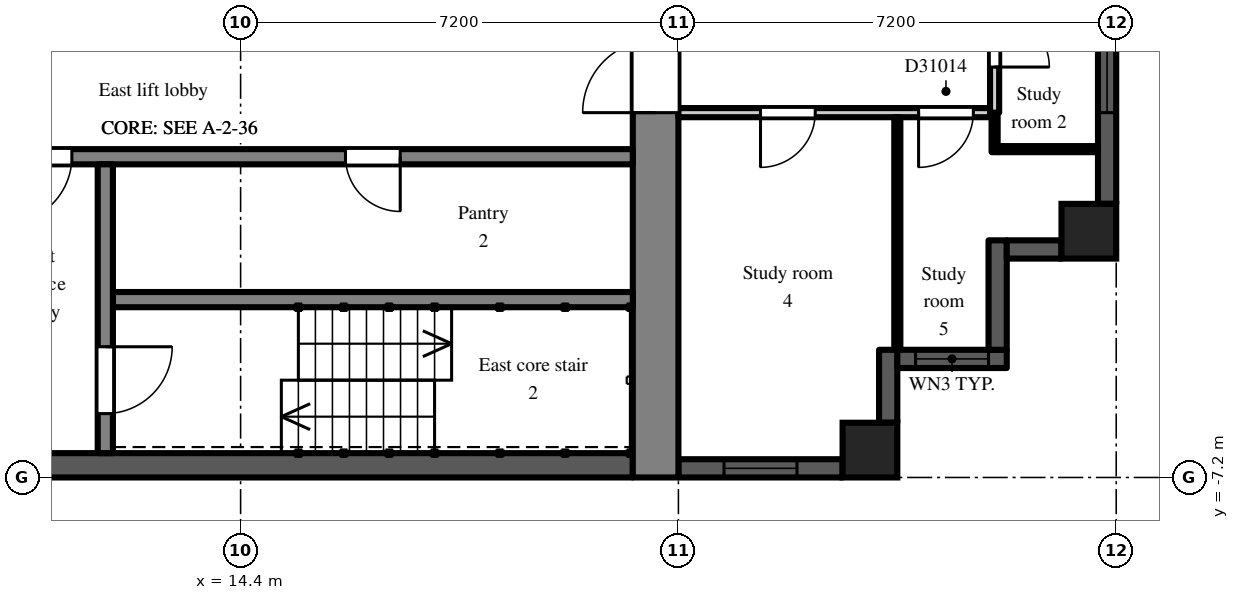
"""IFC4 building model, lengths in metres.
Left out: names, types, materials, properties, quantities, classifications, styles, units other than length and angle.
Written with IfcOpenShell. Run it as: python <this file> out.ifc"""

import sys

from ifc_helpers import new_model, si_unit, direction, frame, frame_2d, origin, origin_2d, place, context, subcontext, project, spatial, rectangle, extrude, element, fill, save


model = new_model("IFC4")
c1 = context("Model", 3, precision=1e-05, world=origin(), true_north=direction((0.0, 1.0)))
c2 = subcontext(c1, "Body", "Model", "MODEL_VIEW")
j1 = project(units=[si_unit("LENGTHUNIT", "METRE"), si_unit("PLANEANGLEUNIT", "RADIAN")], contexts=[c1])
p1 = place(None, origin())
s1 = spatial("IfcSite", under=j1, at=p1, CompositionType="ELEMENT")
p2 = place(p1, origin())
s2 = spatial("IfcBuilding", under=s1, at=p2, CompositionType="ELEMENT")
p3 = place(p2, frame((0.0, 0.0, 216.9)))
s3 = spatial("IfcBuildingStorey", under=s2, at=p3, CompositionType="ELEMENT", Elevation=216.9)
for number, where, z_axis, x_axis in (
    (1, (24.75, -6.75, 0.0), (0.0, 0.0, 1.0), (1.0, 0.0, 0.0)),
    (2, (28.35, -3.15, 0.0), (0.0, 0.0, 1.0), (1.0, 0.0, 0.0)),
):
    element("IfcColumn", number, at=place(p3, frame(where, z_axis=z_axis, x_axis=x_axis)), inside=s3, PredefinedType="COLUMN", context=c2, shape_type="SweptSolid", body=[
        extrude(rectangle(XDim=0.9, YDim=0.9, at=origin_2d()), origin(), (0.0, 0.0, 1.0), 3.0),
    ])
p4 = place(p3, frame((21.6, -7.05, 0.0), z_axis=(0.0, 0.0, 1.0), x_axis=(1.0, 0.0, 0.0)))
e3 = element("IfcWall", 3, at=p4, inside=s3, PredefinedType="SOLIDWALL", context=c2, shape_type="SweptSolid", body=[
    extrude(rectangle(XDim=2.7, YDim=0.3, at=frame_2d((1.35, 0.0))), origin(), (0.0, 0.0, 1.0), 2.3),
])
p5 = place(p4, frame((0.75, 0.0, 0.2)))
e4 = element("IfcOpeningElement", 4, at=p5, cuts=e3, PredefinedType="OPENING", context=c2, shape_type="SweptSolid", body=[
    extrude(rectangle(XDim=1.2, YDim=1.85, at=frame_2d((0.6, 0.925))), frame((0.0, 0.16, 0.0), z_axis=(0.0, -1.0, 0.0), x_axis=(1.0, 0.0, 0.0)), (0.0, 0.0, 1.0), 0.32),
])
p6 = place(p3, frame((25.05, -6.3, 0.0), z_axis=(0.0, 0.0, 1.0), x_axis=(0.0, 1.0, 0.0)))
e5 = element("IfcWall", 5, at=p6, inside=s3, PredefinedType="SOLIDWALL", context=c2, shape_type="SweptSolid", body=[
    extrude(rectangle(XDim=1.2, YDim=0.3, at=frame_2d((0.6, 0.0))), origin(), (0.0, 0.0, 1.0), 2.6),
])
p7 = place(p3, frame((25.2, -5.25, 0.0), z_axis=(0.0, 0.0, 1.0), x_axis=(1.0, 0.0, 0.0)))
e6 = element("IfcWall", 6, at=p7, inside=s3, PredefinedType="SOLIDWALL", context=c2, shape_type="SweptSolid", body=[
    extrude(rectangle(XDim=1.8, YDim=0.3, at=frame_2d((0.9, 0.0))), origin(), (0.0, 0.0, 1.0), 2.6),
])
p8 = place(p7, frame((0.3, 0.0, 0.2)))
e7 = element("IfcOpeningElement", 7, at=p8, cuts=e6, PredefinedType="OPENING", context=c2, shape_type="SweptSolid", body=[
    extrude(rectangle(XDim=1.2, YDim=1.85, at=frame_2d((0.6, 0.925))), frame((0.0, 0.16, 0.0), z_axis=(0.0, -1.0, 0.0), x_axis=(1.0, 0.0, 0.0)), (0.0, 0.0, 1.0), 0.32),
])
p9 = place(p3, frame((26.85, -5.1, 0.0), z_axis=(0.0, 0.0, 1.0), x_axis=(0.0, 1.0, 0.0)))
e8 = element("IfcWall", 8, at=p9, inside=s3, PredefinedType="SOLIDWALL", context=c2, shape_type="SweptSolid", body=[
    extrude(rectangle(XDim=1.8, YDim=0.3, at=frame_2d((0.9, 0.0))), origin(), (0.0, 0.0, 1.0), 2.6),
])
p10 = place(p3, frame((27.0, -3.45, 0.0), z_axis=(0.0, 0.0, 1.0), x_axis=(1.0, 0.0, 0.0)))
e9 = element("IfcWall", 9, at=p10, inside=s3, PredefinedType="SOLIDWALL", context=c2, shape_type="SweptSolid", body=[
    extrude(rectangle(XDim=0.9, YDim=0.3, at=frame_2d((0.45, 0.0))), origin(), (0.0, 0.0, 1.0), 2.6),
])
p11 = place(p3, frame((28.65, -2.7, 0.0), z_axis=(0.0, 0.0, 1.0), x_axis=(0.0, 1.0, 0.0)))
e10 = element("IfcWall", 10, at=p11, inside=s3, PredefinedType="SOLIDWALL", context=c2, shape_type="SweptSolid", body=[
    extrude(rectangle(XDim=5.4, YDim=0.3, at=frame_2d((2.7, 0.0))), origin(), (0.0, 0.0, 1.0), 2.3),
])
p12 = place(p11, frame((1.5, 0.0, 0.2)))
e11 = element("IfcOpeningElement", 11, at=p12, cuts=e10, PredefinedType="OPENING", context=c2, shape_type="SweptSolid", body=[
    extrude(rectangle(XDim=2.4, YDim=1.85, at=frame_2d((1.2, 0.925))), frame((0.0, 0.16, 0.0), z_axis=(0.0, -1.0, 0.0), x_axis=(1.0, 0.0, 0.0)), (0.0, 0.0, 1.0), 0.32),
])
p13 = place(p3, frame((21.225, -7.2, 0.0), z_axis=(0.0, 0.0, 1.0), x_axis=(0.0, 1.0, 0.0)))
e12 = element("IfcWall", 12, at=p13, inside=s3, PredefinedType="SHEAR", context=c2, shape_type="SweptSolid", body=[
    extrude(rectangle(XDim=14.4, YDim=0.75, at=frame_2d((7.2, 0.0))), origin(), (0.0, 0.0, 1.0), 2.6),
])
p14 = place(p13, frame((6.0, 0.0, 0.0)))
e13 = element("IfcOpeningElement", 13, at=p14, cuts=e12, PredefinedType="OPENING", context=c2, shape_type="SweptSolid", body=[
    extrude(rectangle(XDim=2.4, YDim=2.2, at=frame_2d((1.2, 1.1))), frame((0.0, 0.385, 0.0), z_axis=(0.0, -1.0, 0.0), x_axis=(1.0, 0.0, 0.0)), (0.0, 0.0, 1.0), 0.77),
])
p15 = place(p3, frame((7.9, -7.0, 0.0), z_axis=(0.0, 0.0, 1.0), x_axis=(1.0, 0.0, 0.0)))
e14 = element("IfcWall", 14, at=p15, inside=s3, PredefinedType="SHEAR", context=c2, shape_type="SweptSolid", body=[
    extrude(rectangle(XDim=12.95, YDim=0.4, at=frame_2d((6.475, 0.0))), origin(), (0.0, 0.0, 1.0), 2.6),
])
p16 = place(p3, frame((7.9, -1.925, 0.0), z_axis=(0.0, 0.0, 1.0), x_axis=(1.0, 0.0, 0.0)))
e15 = element("IfcWall", 15, at=p16, inside=s3, PredefinedType="SHEAR", context=c2, shape_type="SweptSolid", body=[
    extrude(rectangle(XDim=12.95, YDim=0.25, at=frame_2d((6.475, 0.0))), origin(), (0.0, 0.0, 1.0), 2.6),
])
p17 = place(p16, frame((0.525, 0.0, 0.0)))
e16 = element("IfcOpeningElement", 16, at=p17, cuts=e15, PredefinedType="OPENING", context=c2, shape_type="SweptSolid", body=[
    extrude(rectangle(XDim=0.9, YDim=2.1, at=frame_2d((0.45, 1.05))), frame((0.0, 0.135, 0.0), z_axis=(0.0, -1.0, 0.0), x_axis=(1.0, 0.0, 0.0)), (0.0, 0.0, 1.0), 0.27),
])
p18 = place(p16, frame((2.625, 0.0, 0.0)))
e17 = element("IfcOpeningElement", 17, at=p18, cuts=e15, PredefinedType="OPENING", context=c2, shape_type="SweptSolid", body=[
    extrude(rectangle(XDim=1.1, YDim=2.1, at=frame_2d((0.55, 1.05))), frame((0.0, 0.135, 0.0), z_axis=(0.0, -1.0, 0.0), x_axis=(1.0, 0.0, 0.0)), (0.0, 0.0, 1.0), 0.27),
])
p19 = place(p16, frame((8.225, 0.0, 0.0)))
e18 = element("IfcOpeningElement", 18, at=p19, cuts=e15, PredefinedType="OPENING", context=c2, shape_type="SweptSolid", body=[
    extrude(rectangle(XDim=0.9, YDim=2.1, at=frame_2d((0.45, 1.05))), frame((0.0, 0.135, 0.0), z_axis=(0.0, -1.0, 0.0), x_axis=(1.0, 0.0, 0.0)), (0.0, 0.0, 1.0), 0.27),
])
p20 = place(p3, frame((12.3, -4.275, 0.0), z_axis=(0.0, 0.0, 1.0), x_axis=(1.0, 0.0, 0.0)))
e19 = element("IfcWall", 19, at=p20, inside=s3, PredefinedType="SHEAR", context=c2, shape_type="SweptSolid", body=[
    extrude(rectangle(XDim=8.55, YDim=0.25, at=frame_2d((4.275, 0.0))), origin(), (0.0, 0.0, 1.0), 2.6),
])
p21 = place(p3, frame((12.175, -2.05, 0.0), z_axis=(0.0, 0.0, 1.0), x_axis=(0.0, -1.0, 0.0)))
e20 = element("IfcWall", 20, at=p21, inside=s3, PredefinedType="SHEAR", context=c2, shape_type="SweptSolid", body=[
    extrude(rectangle(XDim=4.75, YDim=0.25, at=frame_2d((2.375, 0.0))), origin(), (0.0, 0.0, 1.0), 2.6),
])
p22 = place(p21, frame((3.0, 0.0, 0.0)))
e21 = element("IfcOpeningElement", 21, at=p22, cuts=e20, PredefinedType="OPENING", context=c2, shape_type="SweptSolid", body=[
    extrude(rectangle(XDim=1.1, YDim=2.1, at=frame_2d((0.55, 1.05))), frame((0.0, 0.135, 0.0), z_axis=(0.0, -1.0, 0.0), x_axis=(1.0, 0.0, 0.0)), (0.0, 0.0, 1.0), 0.27),
])
p23 = place(p3, frame((21.6, -1.2, 0.0), z_axis=(0.0, 0.0, 1.0), x_axis=(1.0, 0.0, 0.0)))
e22 = element("IfcWall", 22, at=p23, inside=s3, PredefinedType="PARTITIONING", context=c2, shape_type="SweptSolid", body=[
    extrude(rectangle(XDim=5.125, YDim=0.15, at=frame_2d((2.562, 0.0))), origin(), (0.0, 0.0, 1.0), 2.6),
])
p24 = place(p23, frame((1.35, 0.0, 0.0)))
e23 = element("IfcOpeningElement", 23, at=p24, cuts=e22, PredefinedType="OPENING", context=c2, shape_type="SweptSolid", body=[
    extrude(rectangle(XDim=0.9, YDim=2.1, at=frame_2d((0.45, 1.05))), frame((0.0, 0.085, 0.0), z_axis=(0.0, -1.0, 0.0), x_axis=(1.0, 0.0, 0.0)), (0.0, 0.0, 1.0), 0.17),
])
p25 = place(p23, frame((3.95, 0.0, 0.0)))
e24 = element("IfcOpeningElement", 24, at=p25, cuts=e22, PredefinedType="OPENING", context=c2, shape_type="SweptSolid", body=[
    extrude(rectangle(XDim=0.9, YDim=2.1, at=frame_2d((0.45, 1.05))), frame((0.0, 0.085, 0.0), z_axis=(0.0, -1.0, 0.0), x_axis=(1.0, 0.0, 0.0)), (0.0, 0.0, 1.0), 0.17),
])
p26 = place(p3, frame((25.2, -5.1, 0.0), z_axis=(0.0, 0.0, 1.0), x_axis=(0.0, 1.0, 0.0)))
e25 = element("IfcWall", 25, at=p26, inside=s3, PredefinedType="PARTITIONING", context=c2, shape_type="SweptSolid", body=[
    extrude(rectangle(XDim=3.825, YDim=0.1, at=frame_2d((1.913, 0.0))), origin(), (0.0, 0.0, 1.0), 2.6),
])
p27 = place(p3, frame((26.8, -1.85, 0.0), z_axis=(0.0, 0.0, 1.0), x_axis=(0.0, 1.0, 0.0)))
e26 = element("IfcWall", 26, at=p27, inside=s3, PredefinedType="PARTITIONING", context=c2, shape_type="SweptSolid", body=[
    extrude(rectangle(XDim=0.65, YDim=0.1, at=frame_2d((0.325, 0.0))), origin(), (0.0, 0.0, 1.0), 2.6),
])
p28 = place(p3, frame((26.85, -1.8, 0.0), z_axis=(0.0, 0.0, 1.0), x_axis=(1.0, 0.0, 0.0)))
e27 = element("IfcWall", 27, at=p28, inside=s3, PredefinedType="PARTITIONING", context=c2, shape_type="SweptSolid", body=[
    extrude(rectangle(XDim=1.65, YDim=0.1, at=frame_2d((0.825, 0.0))), origin(), (0.0, 0.0, 1.0), 2.6),
])
p29 = place(p3, frame((26.8, -1.2, 0.0), z_axis=(0.0, 0.0, 1.0), x_axis=(0.0, 1.0, 0.0)))
e28 = element("IfcWall", 28, at=p29, inside=s3, PredefinedType="PARTITIONING", context=c2, shape_type="SweptSolid", body=[
    extrude(rectangle(XDim=2.4, YDim=0.15, at=frame_2d((1.2, 0.0))), origin(), (0.0, 0.0, 1.0), 2.6),
])
p30 = place(p29, frame((0.75, 0.0, 0.0)))
e29 = element("IfcOpeningElement", 29, at=p30, cuts=e28, PredefinedType="OPENING", context=c2, shape_type="SweptSolid", body=[
    extrude(rectangle(XDim=0.9, YDim=2.1, at=frame_2d((0.45, 1.05))), frame((0.0, 0.085, 0.0), z_axis=(0.0, -1.0, 0.0), x_axis=(1.0, 0.0, 0.0)), (0.0, 0.0, 1.0), 0.17),
])
p31 = place(p5, origin())
e30 = element("IfcWindow", 30, at=p31, inside=s3, PartitioningType="SINGLE_PANEL", PredefinedType="WINDOW", context=c2, shape_type="SweptSolid", body=[
    extrude(rectangle(XDim=1.2, YDim=1.85, at=frame_2d((0.6, 0.925))), frame((0.0, 0.03, 0.0), z_axis=(0.0, -1.0, 0.0), x_axis=(1.0, 0.0, 0.0)), (0.0, 0.0, 1.0), 0.06),
])
fill(e4, e30)
p32 = place(p8, origin())
e31 = element("IfcWindow", 31, at=p32, inside=s3, PartitioningType="SINGLE_PANEL", PredefinedType="WINDOW", context=c2, shape_type="SweptSolid", body=[
    extrude(rectangle(XDim=1.2, YDim=1.85, at=frame_2d((0.6, 0.925))), frame((0.0, 0.03, 0.0), z_axis=(0.0, -1.0, 0.0), x_axis=(1.0, 0.0, 0.0)), (0.0, 0.0, 1.0), 0.06),
])
fill(e7, e31)
p33 = place(p12, origin())
e32 = element("IfcWindow", 32, at=p33, inside=s3, PartitioningType="SINGLE_PANEL", PredefinedType="WINDOW", context=c2, shape_type="SweptSolid", body=[
    extrude(rectangle(XDim=2.4, YDim=1.85, at=frame_2d((1.2, 0.925))), frame((0.0, 0.03, 0.0), z_axis=(0.0, -1.0, 0.0), x_axis=(1.0, 0.0, 0.0)), (0.0, 0.0, 1.0), 0.06),
])
fill(e11, e32)
p34 = place(p22, origin())
e33 = element("IfcDoor", 33, at=p34, inside=s3, OperationType="SINGLE_SWING_LEFT", PredefinedType="DOOR", context=c2, shape_type="SweptSolid", body=[
    extrude(rectangle(XDim=1.1, YDim=2.1, at=frame_2d((0.55, 1.05))), frame((0.0, 0.025, 0.0), z_axis=(0.0, -1.0, 0.0), x_axis=(1.0, 0.0, 0.0)), (0.0, 0.0, 1.0), 0.05),
])
fill(e21, e33)
p35 = place(p18, frame((1.1, 0.0, 0.0), z_axis=(0.0, 0.0, 1.0), x_axis=(-1.0, 0.0, 0.0)))
e34 = element("IfcDoor", 34, at=p35, inside=s3, OperationType="SINGLE_SWING_RIGHT", PredefinedType="DOOR", context=c2, shape_type="SweptSolid", body=[
    extrude(rectangle(XDim=1.1, YDim=2.1, at=frame_2d((0.55, 1.05))), frame((0.0, 0.025, 0.0), z_axis=(0.0, -1.0, 0.0), x_axis=(1.0, 0.0, 0.0)), (0.0, 0.0, 1.0), 0.05),
])
fill(e17, e34)
p36 = place(p14, origin())
e35 = element("IfcDoor", 35, at=p36, inside=s3, OperationType="DOUBLE_DOOR_DOUBLE_SWING", PredefinedType="DOOR", context=c2, shape_type="SweptSolid", body=[
    extrude(rectangle(XDim=2.4, YDim=2.2, at=frame_2d((1.2, 1.1))), frame((0.0, 0.025, 0.0), z_axis=(0.0, -1.0, 0.0), x_axis=(1.0, 0.0, 0.0)), (0.0, 0.0, 1.0), 0.05),
])
fill(e13, e35)
p37 = place(p19, frame((0.9, 0.0, 0.0), z_axis=(0.0, 0.0, 1.0), x_axis=(-1.0, 0.0, 0.0)))
e36 = element("IfcDoor", 36, at=p37, inside=s3, OperationType="SINGLE_SWING_LEFT", PredefinedType="DOOR", context=c2, shape_type="SweptSolid", body=[
    extrude(rectangle(XDim=0.9, YDim=2.1, at=frame_2d((0.45, 1.05))), frame((0.0, 0.025, 0.0), z_axis=(0.0, -1.0, 0.0), x_axis=(1.0, 0.0, 0.0)), (0.0, 0.0, 1.0), 0.05),
])
fill(e18, e36)
p38 = place(p30, frame((0.9, 0.0, 0.0), z_axis=(0.0, 0.0, 1.0), x_axis=(-1.0, 0.0, 0.0)))
e37 = element("IfcDoor", 37, at=p38, inside=s3, OperationType="SINGLE_SWING_RIGHT", PredefinedType="DOOR", context=c2, shape_type="SweptSolid", body=[
    extrude(rectangle(XDim=0.9, YDim=2.1, at=frame_2d((0.45, 1.05))), frame((0.0, 0.025, 0.0), z_axis=(0.0, -1.0, 0.0), x_axis=(1.0, 0.0, 0.0)), (0.0, 0.0, 1.0), 0.05),
])
fill(e29, e37)
p39 = place(p24, frame((0.9, 0.0, 0.0), z_axis=(0.0, 0.0, 1.0), x_axis=(-1.0, 0.0, 0.0)))
e38 = element("IfcDoor", 38, at=p39, inside=s3, OperationType="SINGLE_SWING_RIGHT", PredefinedType="DOOR", context=c2, shape_type="SweptSolid", body=[
    extrude(rectangle(XDim=0.9, YDim=2.1, at=frame_2d((0.45, 1.05))), frame((0.0, 0.025, 0.0), z_axis=(0.0, -1.0, 0.0), x_axis=(1.0, 0.0, 0.0)), (0.0, 0.0, 1.0), 0.05),
])
fill(e23, e38)
p40 = place(p25, frame((0.9, 0.0, 0.0), z_axis=(0.0, 0.0, 1.0), x_axis=(-1.0, 0.0, 0.0)))
e39 = element("IfcDoor", 39, at=p40, inside=s3, OperationType="SINGLE_SWING_RIGHT", PredefinedType="DOOR", context=c2, shape_type="SweptSolid", body=[
    extrude(rectangle(XDim=0.9, YDim=2.1, at=frame_2d((0.45, 1.05))), frame((0.0, 0.025, 0.0), z_axis=(0.0, -1.0, 0.0), x_axis=(1.0, 0.0, 0.0)), (0.0, 0.0, 1.0), 0.05),
])
fill(e24, e39)
save(model, sys.argv[1])
